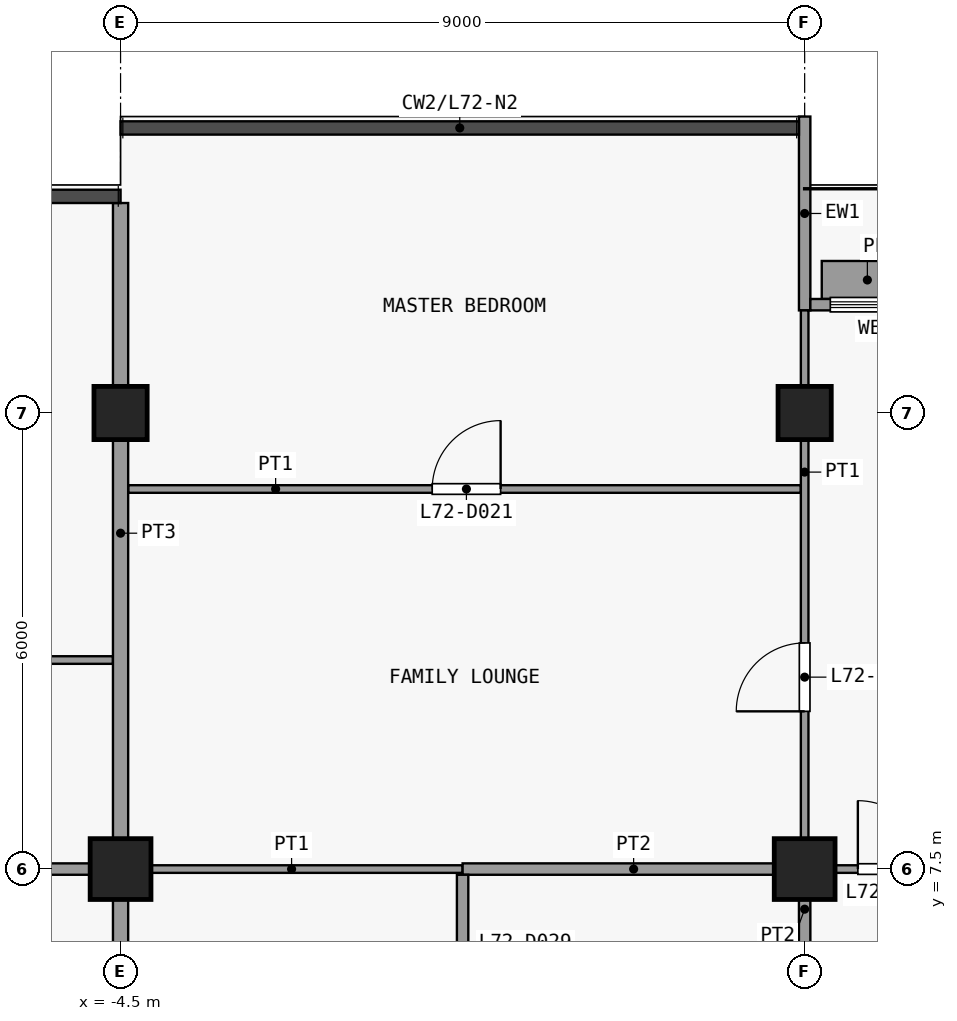
"""IFC4 building model, lengths in metres.
Left out: names, types, materials, properties, quantities, classifications, styles, units other than length and angle.
Written with IfcOpenShell. Run it as: python <this file> out.ifc"""

import sys

from ifc_helpers import new_model, si_unit, direction, frame, frame_2d, origin, origin_2d, place, context, subcontext, project, spatial, rectangle, extrude, element, fill, save


model = new_model("IFC4")
c1 = context("Model", 3, precision=1e-05, world=origin(), true_north=direction((0.0, 1.0)))
c2 = subcontext(c1, "Body", "Model", "MODEL_VIEW")
j1 = project(units=[si_unit("LENGTHUNIT", "METRE"), si_unit("PLANEANGLEUNIT", "RADIAN")], contexts=[c1])
p1 = place(None, origin())
s1 = spatial("IfcSite", under=j1, at=p1, CompositionType="ELEMENT")
p2 = place(p1, origin())
s2 = spatial("IfcBuilding", under=s1, at=p2, CompositionType="ELEMENT")
p3 = place(p2, frame((0.0, 0.0, 284.3)))
s3 = spatial("IfcBuildingStorey", under=s2, at=p3, CompositionType="ELEMENT", Elevation=284.3)
p4 = place(p3, frame((-4.5, 7.5, 0.0), z_axis=(0.0, 0.0, 1.0), x_axis=(1.0, 0.0, 0.0)))
e1 = element("IfcColumn", 1, at=p4, inside=s3, PredefinedType="COLUMN", context=c2, shape_type="SweptSolid", body=[
    extrude(rectangle(XDim=0.8, YDim=0.8, at=origin_2d()), origin(), (0.0, 0.0, 1.0), 3.6),
])
p5 = place(p3, frame((-4.5, 13.5, 0.0), z_axis=(0.0, 0.0, 1.0), x_axis=(1.0, 0.0, 0.0)))
e2 = element("IfcColumn", 2, at=p5, inside=s3, PredefinedType="COLUMN", context=c2, shape_type="SweptSolid", body=[
    extrude(rectangle(XDim=0.7, YDim=0.7, at=origin_2d()), origin(), (0.0, 0.0, 1.0), 3.6),
])
p6 = place(p3, frame((4.5, 7.5, 0.0), z_axis=(0.0, 0.0, 1.0), x_axis=(1.0, 0.0, 0.0)))
e3 = element("IfcColumn", 3, at=p6, inside=s3, PredefinedType="COLUMN", context=c2, shape_type="SweptSolid", body=[
    extrude(rectangle(XDim=0.8, YDim=0.8, at=origin_2d()), origin(), (0.0, 0.0, 1.0), 3.6),
])
p7 = place(p3, frame((4.5, 13.5, 0.0), z_axis=(0.0, 0.0, 1.0), x_axis=(1.0, 0.0, 0.0)))
e4 = element("IfcColumn", 4, at=p7, inside=s3, PredefinedType="COLUMN", context=c2, shape_type="SweptSolid", body=[
    extrude(rectangle(XDim=0.7, YDim=0.7, at=origin_2d()), origin(), (0.0, 0.0, 1.0), 3.6),
])
p8 = place(p3, frame((4.5, 14.85, 0.0), z_axis=(0.0, 0.0, 1.0), x_axis=(0.0, 1.0, 0.0)))
e5 = element("IfcWall", 5, at=p8, inside=s3, PredefinedType="SOLIDWALL", context=c2, shape_type="SweptSolid", body=[
    extrude(rectangle(XDim=2.55, YDim=0.15, at=frame_2d((1.275, 0.0))), origin(), (0.0, 0.0, 1.0), 3.3),
])
p9 = place(p3, frame((4.575, 14.925, 0.0), z_axis=(0.0, 0.0, 1.0), x_axis=(1.0, 0.0, 0.0)))
e6 = element("IfcWall", 6, at=p9, inside=s3, PredefinedType="SOLIDWALL", context=c2, shape_type="SweptSolid", body=[
    extrude(rectangle(XDim=5.85, YDim=0.15, at=frame_2d((2.925, 0.0))), origin(), (0.0, 0.0, 1.0), 3.3),
])
p10 = place(p9, frame((2.325, 0.0, 0.0)))
e7 = element("IfcOpeningElement", 7, at=p10, cuts=e6, PredefinedType="OPENING", context=c2, shape_type="SweptSolid", body=[
    extrude(rectangle(XDim=1.2, YDim=2.4, at=frame_2d((0.6, 1.2))), frame((0.0, 0.085, 0.0), z_axis=(0.0, -1.0, 0.0), x_axis=(1.0, 0.0, 0.0)), (0.0, 0.0, 1.0), 0.17),
])
p11 = place(p9, frame((0.262, 0.0, 0.9)))
e8 = element("IfcOpeningElement", 8, at=p11, cuts=e6, PredefinedType="OPENING", context=c2, shape_type="SweptSolid", body=[
    extrude(rectangle(XDim=1.8, YDim=2.1, at=frame_2d((0.9, 1.05))), frame((0.0, 0.085, 0.0), z_axis=(0.0, -1.0, 0.0), x_axis=(1.0, 0.0, 0.0)), (0.0, 0.0, 1.0), 0.17),
])
p12 = place(p9, frame((3.788, 0.0, 0.9)))
e9 = element("IfcOpeningElement", 9, at=p12, cuts=e6, PredefinedType="OPENING", context=c2, shape_type="SweptSolid", body=[
    extrude(rectangle(XDim=1.8, YDim=2.1, at=frame_2d((0.9, 1.05))), frame((0.0, 0.085, 0.0), z_axis=(0.0, -1.0, 0.0), x_axis=(1.0, 0.0, 0.0)), (0.0, 0.0, 1.0), 0.17),
])
p13 = place(p3, frame((4.725, 15.25, 0.0), z_axis=(0.0, 0.0, 1.0), x_axis=(1.0, 0.0, 0.0)))
e10 = element("IfcWall", 10, at=p13, inside=s3, PredefinedType="USERDEFINED", context=c2, shape_type="SweptSolid", body=[
    extrude(rectangle(XDim=1.2, YDim=0.5, at=frame_2d((0.6, 0.0))), origin(), (0.0, 0.0, 1.0), 0.9),
])
p14 = place(p3, frame((-4.5, 7.5, 0.0), z_axis=(0.0, 0.0, 1.0), x_axis=(1.0, 0.0, 0.0)))
e11 = element("IfcWall", 11, at=p14, inside=s3, PredefinedType="PARTITIONING", context=c2, shape_type="SweptSolid", body=[
    extrude(rectangle(XDim=4.5, YDim=0.1, at=frame_2d((2.25, 0.0))), origin(), (0.0, 0.0, 1.0), 3.3),
])
p15 = place(p3, frame((4.5, 7.5, 0.0), z_axis=(0.0, 0.0, 1.0), x_axis=(1.0, 0.0, 0.0)))
e12 = element("IfcWall", 12, at=p15, inside=s3, PredefinedType="PARTITIONING", context=c2, shape_type="SweptSolid", body=[
    extrude(rectangle(XDim=2.4, YDim=0.1, at=frame_2d((1.2, 0.0))), origin(), (0.0, 0.0, 1.0), 3.3),
])
p16 = place(p15, frame((0.7, 0.0, 0.0)))
e13 = element("IfcOpeningElement", 13, at=p16, cuts=e12, PredefinedType="OPENING", context=c2, shape_type="SweptSolid", body=[
    extrude(rectangle(XDim=0.9, YDim=2.1, at=frame_2d((0.45, 1.05))), frame((0.0, 0.06, 0.0), z_axis=(0.0, -1.0, 0.0), x_axis=(1.0, 0.0, 0.0)), (0.0, 0.0, 1.0), 0.12),
])
p17 = place(p3, frame((-10.5, 7.5, 0.0), z_axis=(0.0, 0.0, 1.0), x_axis=(1.0, 0.0, 0.0)))
e14 = element("IfcWall", 14, at=p17, inside=s3, PredefinedType="PARTITIONING", context=c2, shape_type="SweptSolid", body=[
    extrude(rectangle(XDim=6.0, YDim=0.15, at=frame_2d((3.0, 0.0))), origin(), (0.0, 0.0, 1.0), 3.3),
])
p18 = place(p3, frame((0.0, 7.5, 0.0), z_axis=(0.0, 0.0, 1.0), x_axis=(1.0, 0.0, 0.0)))
e15 = element("IfcWall", 15, at=p18, inside=s3, PredefinedType="PARTITIONING", context=c2, shape_type="SweptSolid", body=[
    extrude(rectangle(XDim=4.5, YDim=0.15, at=frame_2d((2.25, 0.0))), origin(), (0.0, 0.0, 1.0), 3.3),
])
p19 = place(p3, frame((-10.45, 10.25, 0.0), z_axis=(0.0, 0.0, 1.0), x_axis=(1.0, 0.0, 0.0)))
e16 = element("IfcWall", 16, at=p19, inside=s3, PredefinedType="PARTITIONING", context=c2, shape_type="SweptSolid", body=[
    extrude(rectangle(XDim=5.85, YDim=0.1, at=frame_2d((2.925, 0.0))), origin(), (0.0, 0.0, 1.0), 3.3),
])
p20 = place(p19, frame((2.5, 0.0, 0.0)))
e17 = element("IfcOpeningElement", 17, at=p20, cuts=e16, PredefinedType="OPENING", context=c2, shape_type="SweptSolid", body=[
    extrude(rectangle(XDim=0.9, YDim=2.1, at=frame_2d((0.45, 1.05))), frame((0.0, 0.06, 0.0), z_axis=(0.0, -1.0, 0.0), x_axis=(1.0, 0.0, 0.0)), (0.0, 0.0, 1.0), 0.12),
])
p21 = place(p3, frame((-4.4, 12.5, 0.0), z_axis=(0.0, 0.0, 1.0), x_axis=(1.0, 0.0, 0.0)))
e18 = element("IfcWall", 18, at=p21, inside=s3, PredefinedType="PARTITIONING", context=c2, shape_type="SweptSolid", body=[
    extrude(rectangle(XDim=8.85, YDim=0.1, at=frame_2d((4.425, 0.0))), origin(), (0.0, 0.0, 1.0), 3.3),
])
p22 = place(p21, frame((4.0, 0.0, 0.0)))
e19 = element("IfcOpeningElement", 19, at=p22, cuts=e18, PredefinedType="OPENING", context=c2, shape_type="SweptSolid", body=[
    extrude(rectangle(XDim=0.9, YDim=2.1, at=frame_2d((0.45, 1.05))), frame((0.0, 0.06, 0.0), z_axis=(0.0, -1.0, 0.0), x_axis=(1.0, 0.0, 0.0)), (0.0, 0.0, 1.0), 0.12),
])
p23 = place(p3, frame((-4.5, 4.6, 0.0), z_axis=(0.0, 0.0, 1.0), x_axis=(0.0, 1.0, 0.0)))
e20 = element("IfcWall", 20, at=p23, inside=s3, PredefinedType="PARTITIONING", context=c2, shape_type="SweptSolid", body=[
    extrude(rectangle(XDim=2.825, YDim=0.2, at=frame_2d((1.413, 0.0))), origin(), (0.0, 0.0, 1.0), 3.3),
])
p24 = place(p3, frame((-4.5, 7.575, 0.0), z_axis=(0.0, 0.0, 1.0), x_axis=(0.0, 1.0, 0.0)))
e21 = element("IfcWall", 21, at=p24, inside=s3, PredefinedType="PARTITIONING", context=c2, shape_type="SweptSolid", body=[
    extrude(rectangle(XDim=8.688, YDim=0.2, at=frame_2d((4.344, 0.0))), origin(), (0.0, 0.0, 1.0), 3.3),
])
p25 = place(p3, frame((0.0, 4.6, 0.0), z_axis=(0.0, 0.0, 1.0), x_axis=(0.0, 1.0, 0.0)))
e22 = element("IfcWall", 22, at=p25, inside=s3, PredefinedType="PARTITIONING", context=c2, shape_type="SweptSolid", body=[
    extrude(rectangle(XDim=2.825, YDim=0.15, at=frame_2d((1.413, 0.0))), origin(), (0.0, 0.0, 1.0), 3.3),
])
p26 = place(p25, frame((1.0, 0.0, 0.0)))
e23 = element("IfcOpeningElement", 23, at=p26, cuts=e22, PredefinedType="OPENING", context=c2, shape_type="SweptSolid", body=[
    extrude(rectangle(XDim=0.9, YDim=2.1, at=frame_2d((0.45, 1.05))), frame((0.0, 0.085, 0.0), z_axis=(0.0, -1.0, 0.0), x_axis=(1.0, 0.0, 0.0)), (0.0, 0.0, 1.0), 0.17),
])
p27 = place(p3, frame((4.5, 7.575, 0.0), z_axis=(0.0, 0.0, 1.0), x_axis=(0.0, 1.0, 0.0)))
e24 = element("IfcWall", 24, at=p27, inside=s3, PredefinedType="PARTITIONING", context=c2, shape_type="SweptSolid", body=[
    extrude(rectangle(XDim=7.275, YDim=0.1, at=frame_2d((3.638, 0.0))), origin(), (0.0, 0.0, 1.0), 3.3),
])
p28 = place(p27, frame((2.0, 0.0, 0.0)))
e25 = element("IfcOpeningElement", 25, at=p28, cuts=e24, PredefinedType="OPENING", context=c2, shape_type="SweptSolid", body=[
    extrude(rectangle(XDim=0.9, YDim=2.1, at=frame_2d((0.45, 1.05))), frame((0.0, 0.06, 0.0), z_axis=(0.0, -1.0, 0.0), x_axis=(1.0, 0.0, 0.0)), (0.0, 0.0, 1.0), 0.12),
])
p29 = place(p3, frame((4.5, 4.6, 0.0), z_axis=(0.0, 0.0, 1.0), x_axis=(0.0, 1.0, 0.0)))
e26 = element("IfcWall", 26, at=p29, inside=s3, PredefinedType="PARTITIONING", context=c2, shape_type="SweptSolid", body=[
    extrude(rectangle(XDim=2.825, YDim=0.15, at=frame_2d((1.413, 0.0))), origin(), (0.0, 0.0, 1.0), 3.3),
])
p30 = place(p29, frame((0.9, 0.0, 0.0)))
e27 = element("IfcOpeningElement", 27, at=p30, cuts=e26, PredefinedType="OPENING", context=c2, shape_type="SweptSolid", body=[
    extrude(rectangle(XDim=0.9, YDim=2.1, at=frame_2d((0.45, 1.05))), frame((0.0, 0.085, 0.0), z_axis=(0.0, -1.0, 0.0), x_axis=(1.0, 0.0, 0.0)), (0.0, 0.0, 1.0), 0.17),
])
p31 = place(p11, origin())
e28 = element("IfcWindow", 28, at=p31, inside=s3, PartitioningType="SINGLE_PANEL", PredefinedType="WINDOW", context=c2, shape_type="SweptSolid", body=[
    extrude(rectangle(XDim=1.8, YDim=2.1, at=frame_2d((0.9, 1.05))), frame((0.0, 0.03, 0.0), z_axis=(0.0, -1.0, 0.0), x_axis=(1.0, 0.0, 0.0)), (0.0, 0.0, 1.0), 0.06),
])
fill(e8, e28)
p32 = place(p16, origin())
e29 = element("IfcDoor", 29, at=p32, inside=s3, OperationType="SINGLE_SWING_RIGHT", PredefinedType="DOOR", context=c2, shape_type="SweptSolid", body=[
    extrude(rectangle(XDim=0.9, YDim=2.1, at=frame_2d((0.45, 1.05))), frame((0.0, 0.025, 0.0), z_axis=(0.0, -1.0, 0.0), x_axis=(1.0, 0.0, 0.0)), (0.0, 0.0, 1.0), 0.05),
])
fill(e13, e29)
p33 = place(p22, origin())
e30 = element("IfcDoor", 30, at=p33, inside=s3, OperationType="SINGLE_SWING_LEFT", PredefinedType="DOOR", context=c2, shape_type="SweptSolid", body=[
    extrude(rectangle(XDim=0.9, YDim=2.1, at=frame_2d((0.45, 1.05))), frame((0.0, 0.025, 0.0), z_axis=(0.0, -1.0, 0.0), x_axis=(1.0, 0.0, 0.0)), (0.0, 0.0, 1.0), 0.05),
])
fill(e19, e30)
p34 = place(p28, origin())
e31 = element("IfcDoor", 31, at=p34, inside=s3, OperationType="SINGLE_SWING_RIGHT", PredefinedType="DOOR", context=c2, shape_type="SweptSolid", body=[
    extrude(rectangle(XDim=0.9, YDim=2.1, at=frame_2d((0.45, 1.05))), frame((0.0, 0.025, 0.0), z_axis=(0.0, -1.0, 0.0), x_axis=(1.0, 0.0, 0.0)), (0.0, 0.0, 1.0), 0.05),
])
fill(e25, e31)
save(model, sys.argv[1])
